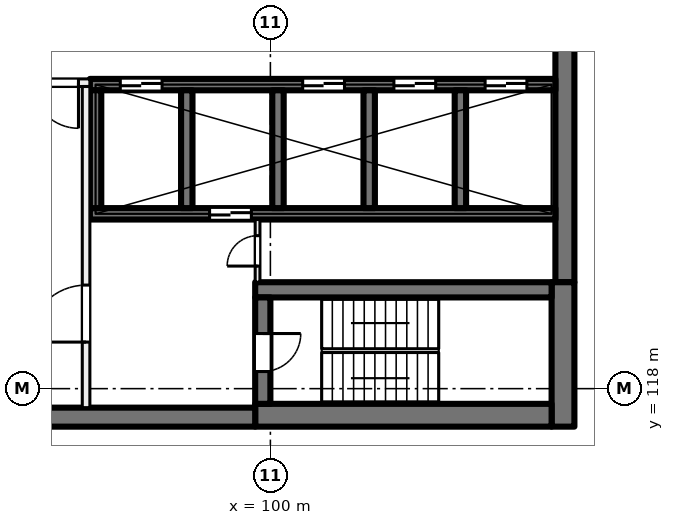
"""IFC4 building model, lengths in metres.
Left out: names, types, materials, properties, quantities, classifications, styles, units other than length and angle.
Written with IfcOpenShell. Run it as: python <this file> out.ifc"""

import sys

from ifc_helpers import new_model, si_unit, direction, frame, frame_2d, origin, place, context, subcontext, project, spatial, rectangle, extrude, element, fill, save


model = new_model("IFC4")
c1 = context("Model", 3, precision=1e-05, world=origin(), true_north=direction((0.0, 1.0)))
c2 = subcontext(c1, "Body", "Model", "MODEL_VIEW")
j1 = project(units=[si_unit("LENGTHUNIT", "METRE"), si_unit("PLANEANGLEUNIT", "RADIAN")], contexts=[c1])
p1 = place(None, origin())
s1 = spatial("IfcSite", under=j1, at=p1, CompositionType="ELEMENT")
p2 = place(p1, origin())
s2 = spatial("IfcBuilding", under=s1, at=p2, CompositionType="ELEMENT")
p3 = place(p2, frame((0.0, 0.0, 228.0)))
s3 = spatial("IfcBuildingStorey", under=s2, at=p3, CompositionType="ELEMENT", Elevation=228.0)
p4 = place(p3, frame((107.75, 135.2, 0.0), z_axis=(0.0, 0.0, 1.0), x_axis=(0.0, -1.0, 0.0)))
e1 = element("IfcWall", 1, at=p4, inside=s3, PredefinedType="SHEAR", context=c2, shape_type="SweptSolid", body=[
    extrude(rectangle(XDim=14.4, YDim=0.5, at=frame_2d((7.2, 0.0))), origin(), (0.0, 0.0, 1.0), 4.0),
])
p5 = place(p3, frame((107.7, 120.8, 0.0), z_axis=(0.0, 0.0, 1.0), x_axis=(0.0, -1.0, 0.0)))
e2 = element("IfcWall", 2, at=p5, inside=s3, PredefinedType="SHEAR", context=c2, shape_type="SweptSolid", body=[
    extrude(rectangle(XDim=3.8, YDim=0.6, at=frame_2d((1.9, 0.0))), origin(), (0.0, 0.0, 1.0), 4.0),
])
p6 = place(p3, frame((107.4, 117.3, 0.0), z_axis=(0.0, 0.0, 1.0), x_axis=(-1.0, 0.0, 0.0)))
e3 = element("IfcWall", 3, at=p6, inside=s3, PredefinedType="SHEAR", context=c2, shape_type="SweptSolid", body=[
    extrude(rectangle(XDim=7.8, YDim=0.6, at=frame_2d((3.9, 0.0))), origin(), (0.0, 0.0, 1.0), 4.0),
])
p7 = place(p3, frame((99.6, 117.25, 0.0), z_axis=(0.0, 0.0, 1.0), x_axis=(-1.0, 0.0, 0.0)))
e4 = element("IfcWall", 4, at=p7, inside=s3, PredefinedType="SHEAR", context=c2, shape_type="SweptSolid", body=[
    extrude(rectangle(XDim=8.975, YDim=0.5, at=frame_2d((4.488, 0.0))), origin(), (0.0, 0.0, 1.0), 4.0),
])
p8 = place(p3, frame((107.4, 120.6, 0.0), z_axis=(0.0, 0.0, 1.0), x_axis=(-1.0, 0.0, 0.0)))
e5 = element("IfcWall", 5, at=p8, inside=s3, PredefinedType="SHEAR", context=c2, shape_type="SweptSolid", body=[
    extrude(rectangle(XDim=7.8, YDim=0.4, at=frame_2d((3.9, 0.0))), origin(), (0.0, 0.0, 1.0), 4.0),
])
p9 = place(p3, frame((99.8, 120.4, 0.0), z_axis=(0.0, 0.0, 1.0), x_axis=(0.0, -1.0, 0.0)))
e6 = element("IfcWall", 6, at=p9, inside=s3, PredefinedType="SHEAR", context=c2, shape_type="SweptSolid", body=[
    extrude(rectangle(XDim=2.8, YDim=0.4, at=frame_2d((1.4, 0.0))), origin(), (0.0, 0.0, 1.0), 4.0),
])
p10 = place(p9, frame((0.95, 0.0, 0.0)))
e7 = element("IfcOpeningElement", 7, at=p10, cuts=e6, PredefinedType="OPENING", context=c2, shape_type="SweptSolid", body=[
    extrude(rectangle(XDim=1.0, YDim=2.1, at=frame_2d((0.5, 1.05))), frame((0.0, 0.21, 0.0), z_axis=(0.0, -1.0, 0.0), x_axis=(1.0, 0.0, 0.0)), (0.0, 0.0, 1.0), 0.42),
])
p11 = place(p3, frame((107.5, 126.0, 0.0), z_axis=(0.0, 0.0, 1.0), x_axis=(-1.0, 0.0, 0.0)))
e8 = element("IfcWall", 8, at=p11, inside=s3, PredefinedType="SHEAR", context=c2, shape_type="SweptSolid", body=[
    extrude(rectangle(XDim=12.25, YDim=0.3, at=frame_2d((6.125, 0.0))), origin(), (0.0, 0.0, 1.0), 4.0),
])
p12 = place(p11, frame((0.75, 0.0, 0.0)))
e9 = element("IfcOpeningElement", 9, at=p12, cuts=e8, PredefinedType="OPENING", context=c2, shape_type="SweptSolid", body=[
    extrude(rectangle(XDim=1.1, YDim=2.1, at=frame_2d((0.55, 1.05))), frame((0.0, 0.16, 0.0), z_axis=(0.0, -1.0, 0.0), x_axis=(1.0, 0.0, 0.0)), (0.0, 0.0, 1.0), 0.32),
])
p13 = place(p11, frame((3.15, 0.0, 0.0)))
e10 = element("IfcOpeningElement", 10, at=p13, cuts=e8, PredefinedType="OPENING", context=c2, shape_type="SweptSolid", body=[
    extrude(rectangle(XDim=1.1, YDim=2.1, at=frame_2d((0.55, 1.05))), frame((0.0, 0.16, 0.0), z_axis=(0.0, -1.0, 0.0), x_axis=(1.0, 0.0, 0.0)), (0.0, 0.0, 1.0), 0.32),
])
p14 = place(p11, frame((5.55, 0.0, 0.0)))
e11 = element("IfcOpeningElement", 11, at=p14, cuts=e8, PredefinedType="OPENING", context=c2, shape_type="SweptSolid", body=[
    extrude(rectangle(XDim=1.1, YDim=2.1, at=frame_2d((0.55, 1.05))), frame((0.0, 0.16, 0.0), z_axis=(0.0, -1.0, 0.0), x_axis=(1.0, 0.0, 0.0)), (0.0, 0.0, 1.0), 0.32),
])
p15 = place(p11, frame((10.35, 0.0, 0.0)))
e12 = element("IfcOpeningElement", 12, at=p15, cuts=e8, PredefinedType="OPENING", context=c2, shape_type="SweptSolid", body=[
    extrude(rectangle(XDim=1.1, YDim=2.1, at=frame_2d((0.55, 1.05))), frame((0.0, 0.16, 0.0), z_axis=(0.0, -1.0, 0.0), x_axis=(1.0, 0.0, 0.0)), (0.0, 0.0, 1.0), 0.32),
])
p16 = place(p3, frame((107.5, 122.6, 0.0), z_axis=(0.0, 0.0, 1.0), x_axis=(-1.0, 0.0, 0.0)))
e13 = element("IfcWall", 13, at=p16, inside=s3, PredefinedType="SHEAR", context=c2, shape_type="SweptSolid", body=[
    extrude(rectangle(XDim=12.25, YDim=0.3, at=frame_2d((6.125, 0.0))), origin(), (0.0, 0.0, 1.0), 4.0),
])
p17 = place(p16, frame((8.0, 0.0, 0.0)))
e14 = element("IfcOpeningElement", 14, at=p17, cuts=e13, PredefinedType="OPENING", context=c2, shape_type="SweptSolid", body=[
    extrude(rectangle(XDim=1.1, YDim=2.1, at=frame_2d((0.55, 1.05))), frame((0.0, 0.16, 0.0), z_axis=(0.0, -1.0, 0.0), x_axis=(1.0, 0.0, 0.0)), (0.0, 0.0, 1.0), 0.32),
])
for number, where, z_axis, x_axis in (
    (15, (105.0, 125.85, 0.0), (0.0, 0.0, 1.0), (0.0, -1.0, 0.0)),
    (16, (102.6, 125.85, 0.0), (0.0, 0.0, 1.0), (0.0, -1.0, 0.0)),
    (17, (100.2, 125.85, 0.0), (0.0, 0.0, 1.0), (0.0, -1.0, 0.0)),
    (18, (97.8, 125.85, 0.0), (0.0, 0.0, 1.0), (0.0, -1.0, 0.0)),
    (19, (95.4, 125.85, 0.0), (0.0, 0.0, 1.0), (0.0, -1.0, 0.0)),
):
    element("IfcWall", number, at=place(p3, frame(where, z_axis=z_axis, x_axis=x_axis)), inside=s3, PredefinedType="SHEAR", context=c2, shape_type="SweptSolid", body=[
        extrude(rectangle(XDim=3.1, YDim=0.3, at=frame_2d((1.55, 0.0))), origin(), (0.0, 0.0, 1.0), 4.0),
    ])
p18 = place(p3, frame((95.25, 126.05, 0.0), z_axis=(0.0, 0.0, 1.0), x_axis=(-1.0, 0.0, 0.0)))
e20 = element("IfcWall", 20, at=p18, inside=s3, PredefinedType="PARTITIONING", context=c2, shape_type="SweptSolid", body=[
    extrude(rectangle(XDim=3.95, YDim=0.2, at=frame_2d((1.975, 0.0))), origin(), (0.0, 0.0, 1.0), 3.625),
])
p19 = place(p18, frame((0.3, 0.0, 0.0)))
e21 = element("IfcOpeningElement", 21, at=p19, cuts=e20, PredefinedType="OPENING", context=c2, shape_type="SweptSolid", body=[
    extrude(rectangle(XDim=1.2, YDim=2.1, at=frame_2d((0.6, 1.05))), frame((0.0, 0.11, 0.0), z_axis=(0.0, -1.0, 0.0), x_axis=(1.0, 0.0, 0.0)), (0.0, 0.0, 1.0), 0.22),
])
p20 = place(p3, frame((95.15, 117.5, 0.0), z_axis=(0.0, 0.0, 1.0), x_axis=(0.0, 1.0, 0.0)))
e22 = element("IfcWall", 22, at=p20, inside=s3, PredefinedType="PARTITIONING", context=c2, shape_type="SweptSolid", body=[
    extrude(rectangle(XDim=8.45, YDim=0.2, at=frame_2d((4.225, 0.0))), origin(), (0.0, 0.0, 1.0), 3.625),
])
p21 = place(p20, frame((1.725, 0.0, 0.0)))
e23 = element("IfcOpeningElement", 23, at=p21, cuts=e22, PredefinedType="OPENING", context=c2, shape_type="SweptSolid", body=[
    extrude(rectangle(XDim=1.5, YDim=2.1, at=frame_2d((0.75, 1.05))), frame((0.0, 0.11, 0.0), z_axis=(0.0, -1.0, 0.0), x_axis=(1.0, 0.0, 0.0)), (0.0, 0.0, 1.0), 0.22),
])
p22 = place(p3, frame((99.663, 120.8, 0.0), z_axis=(0.0, 0.0, 1.0), x_axis=(0.0, 1.0, 0.0)))
e24 = element("IfcWall", 24, at=p22, inside=s3, PredefinedType="PARTITIONING", context=c2, shape_type="SweptSolid", body=[
    extrude(rectangle(XDim=1.65, YDim=0.125, at=frame_2d((0.825, 0.0))), origin(), (0.0, 0.0, 1.0), 3.625),
])
p23 = place(p22, frame((0.425, 0.0, 0.0)))
e25 = element("IfcOpeningElement", 25, at=p23, cuts=e24, PredefinedType="OPENING", context=c2, shape_type="SweptSolid", body=[
    extrude(rectangle(XDim=0.8, YDim=2.1, at=frame_2d((0.4, 1.05))), frame((0.0, 0.073, 0.0), z_axis=(0.0, -1.0, 0.0), x_axis=(1.0, 0.0, 0.0)), (0.0, 0.0, 1.0), 0.145),
])
p24 = place(p12, origin())
e26 = element("IfcDoor", 26, at=p24, inside=s3, OperationType="DOUBLE_DOOR_SLIDING", PredefinedType="DOOR", context=c2, shape_type="SweptSolid", body=[
    extrude(rectangle(XDim=1.1, YDim=2.1, at=frame_2d((0.55, 1.05))), frame((0.0, 0.025, 0.0), z_axis=(0.0, -1.0, 0.0), x_axis=(1.0, 0.0, 0.0)), (0.0, 0.0, 1.0), 0.05),
])
fill(e9, e26)
p25 = place(p13, origin())
e27 = element("IfcDoor", 27, at=p25, inside=s3, OperationType="DOUBLE_DOOR_SLIDING", PredefinedType="DOOR", context=c2, shape_type="SweptSolid", body=[
    extrude(rectangle(XDim=1.1, YDim=2.1, at=frame_2d((0.55, 1.05))), frame((0.0, 0.025, 0.0), z_axis=(0.0, -1.0, 0.0), x_axis=(1.0, 0.0, 0.0)), (0.0, 0.0, 1.0), 0.05),
])
fill(e10, e27)
p26 = place(p14, origin())
e28 = element("IfcDoor", 28, at=p26, inside=s3, OperationType="DOUBLE_DOOR_SLIDING", PredefinedType="DOOR", context=c2, shape_type="SweptSolid", body=[
    extrude(rectangle(XDim=1.1, YDim=2.1, at=frame_2d((0.55, 1.05))), frame((0.0, 0.025, 0.0), z_axis=(0.0, -1.0, 0.0), x_axis=(1.0, 0.0, 0.0)), (0.0, 0.0, 1.0), 0.05),
])
fill(e11, e28)
p27 = place(p15, origin())
e29 = element("IfcDoor", 29, at=p27, inside=s3, OperationType="DOUBLE_DOOR_SLIDING", PredefinedType="DOOR", context=c2, shape_type="SweptSolid", body=[
    extrude(rectangle(XDim=1.1, YDim=2.1, at=frame_2d((0.55, 1.05))), frame((0.0, 0.025, 0.0), z_axis=(0.0, -1.0, 0.0), x_axis=(1.0, 0.0, 0.0)), (0.0, 0.0, 1.0), 0.05),
])
fill(e12, e29)
p28 = place(p19, origin())
e30 = element("IfcDoor", 30, at=p28, inside=s3, OperationType="DOUBLE_DOOR_SINGLE_SWING", PredefinedType="DOOR", context=c2, shape_type="SweptSolid", body=[
    extrude(rectangle(XDim=1.2, YDim=2.1, at=frame_2d((0.6, 1.05))), frame((0.0, 0.025, 0.0), z_axis=(0.0, -1.0, 0.0), x_axis=(1.0, 0.0, 0.0)), (0.0, 0.0, 1.0), 0.05),
])
fill(e21, e30)
p29 = place(p21, origin())
e31 = element("IfcDoor", 31, at=p29, inside=s3, OperationType="DOUBLE_DOOR_SINGLE_SWING", PredefinedType="DOOR", context=c2, shape_type="SweptSolid", body=[
    extrude(rectangle(XDim=1.5, YDim=2.1, at=frame_2d((0.75, 1.05))), frame((0.0, 0.025, 0.0), z_axis=(0.0, -1.0, 0.0), x_axis=(1.0, 0.0, 0.0)), (0.0, 0.0, 1.0), 0.05),
])
fill(e23, e31)
p30 = place(p10, origin())
e32 = element("IfcDoor", 32, at=p30, inside=s3, OperationType="SINGLE_SWING_LEFT", PredefinedType="DOOR", context=c2, shape_type="SweptSolid", body=[
    extrude(rectangle(XDim=1.0, YDim=2.1, at=frame_2d((0.5, 1.05))), frame((0.0, 0.025, 0.0), z_axis=(0.0, -1.0, 0.0), x_axis=(1.0, 0.0, 0.0)), (0.0, 0.0, 1.0), 0.05),
])
fill(e7, e32)
p31 = place(p23, origin())
e33 = element("IfcDoor", 33, at=p31, inside=s3, OperationType="SINGLE_SWING_RIGHT", PredefinedType="DOOR", context=c2, shape_type="SweptSolid", body=[
    extrude(rectangle(XDim=0.8, YDim=2.1, at=frame_2d((0.4, 1.05))), frame((0.0, 0.025, 0.0), z_axis=(0.0, -1.0, 0.0), x_axis=(1.0, 0.0, 0.0)), (0.0, 0.0, 1.0), 0.05),
])
fill(e25, e33)
p32 = place(p17, origin())
e34 = element("IfcDoor", 34, at=p32, inside=s3, OperationType="DOUBLE_DOOR_SLIDING", PredefinedType="DOOR", context=c2, shape_type="SweptSolid", body=[
    extrude(rectangle(XDim=1.1, YDim=2.1, at=frame_2d((0.55, 1.05))), frame((0.0, 0.025, 0.0), z_axis=(0.0, -1.0, 0.0), x_axis=(1.0, 0.0, 0.0)), (0.0, 0.0, 1.0), 0.05),
])
fill(e14, e34)
save(model, sys.argv[1])
